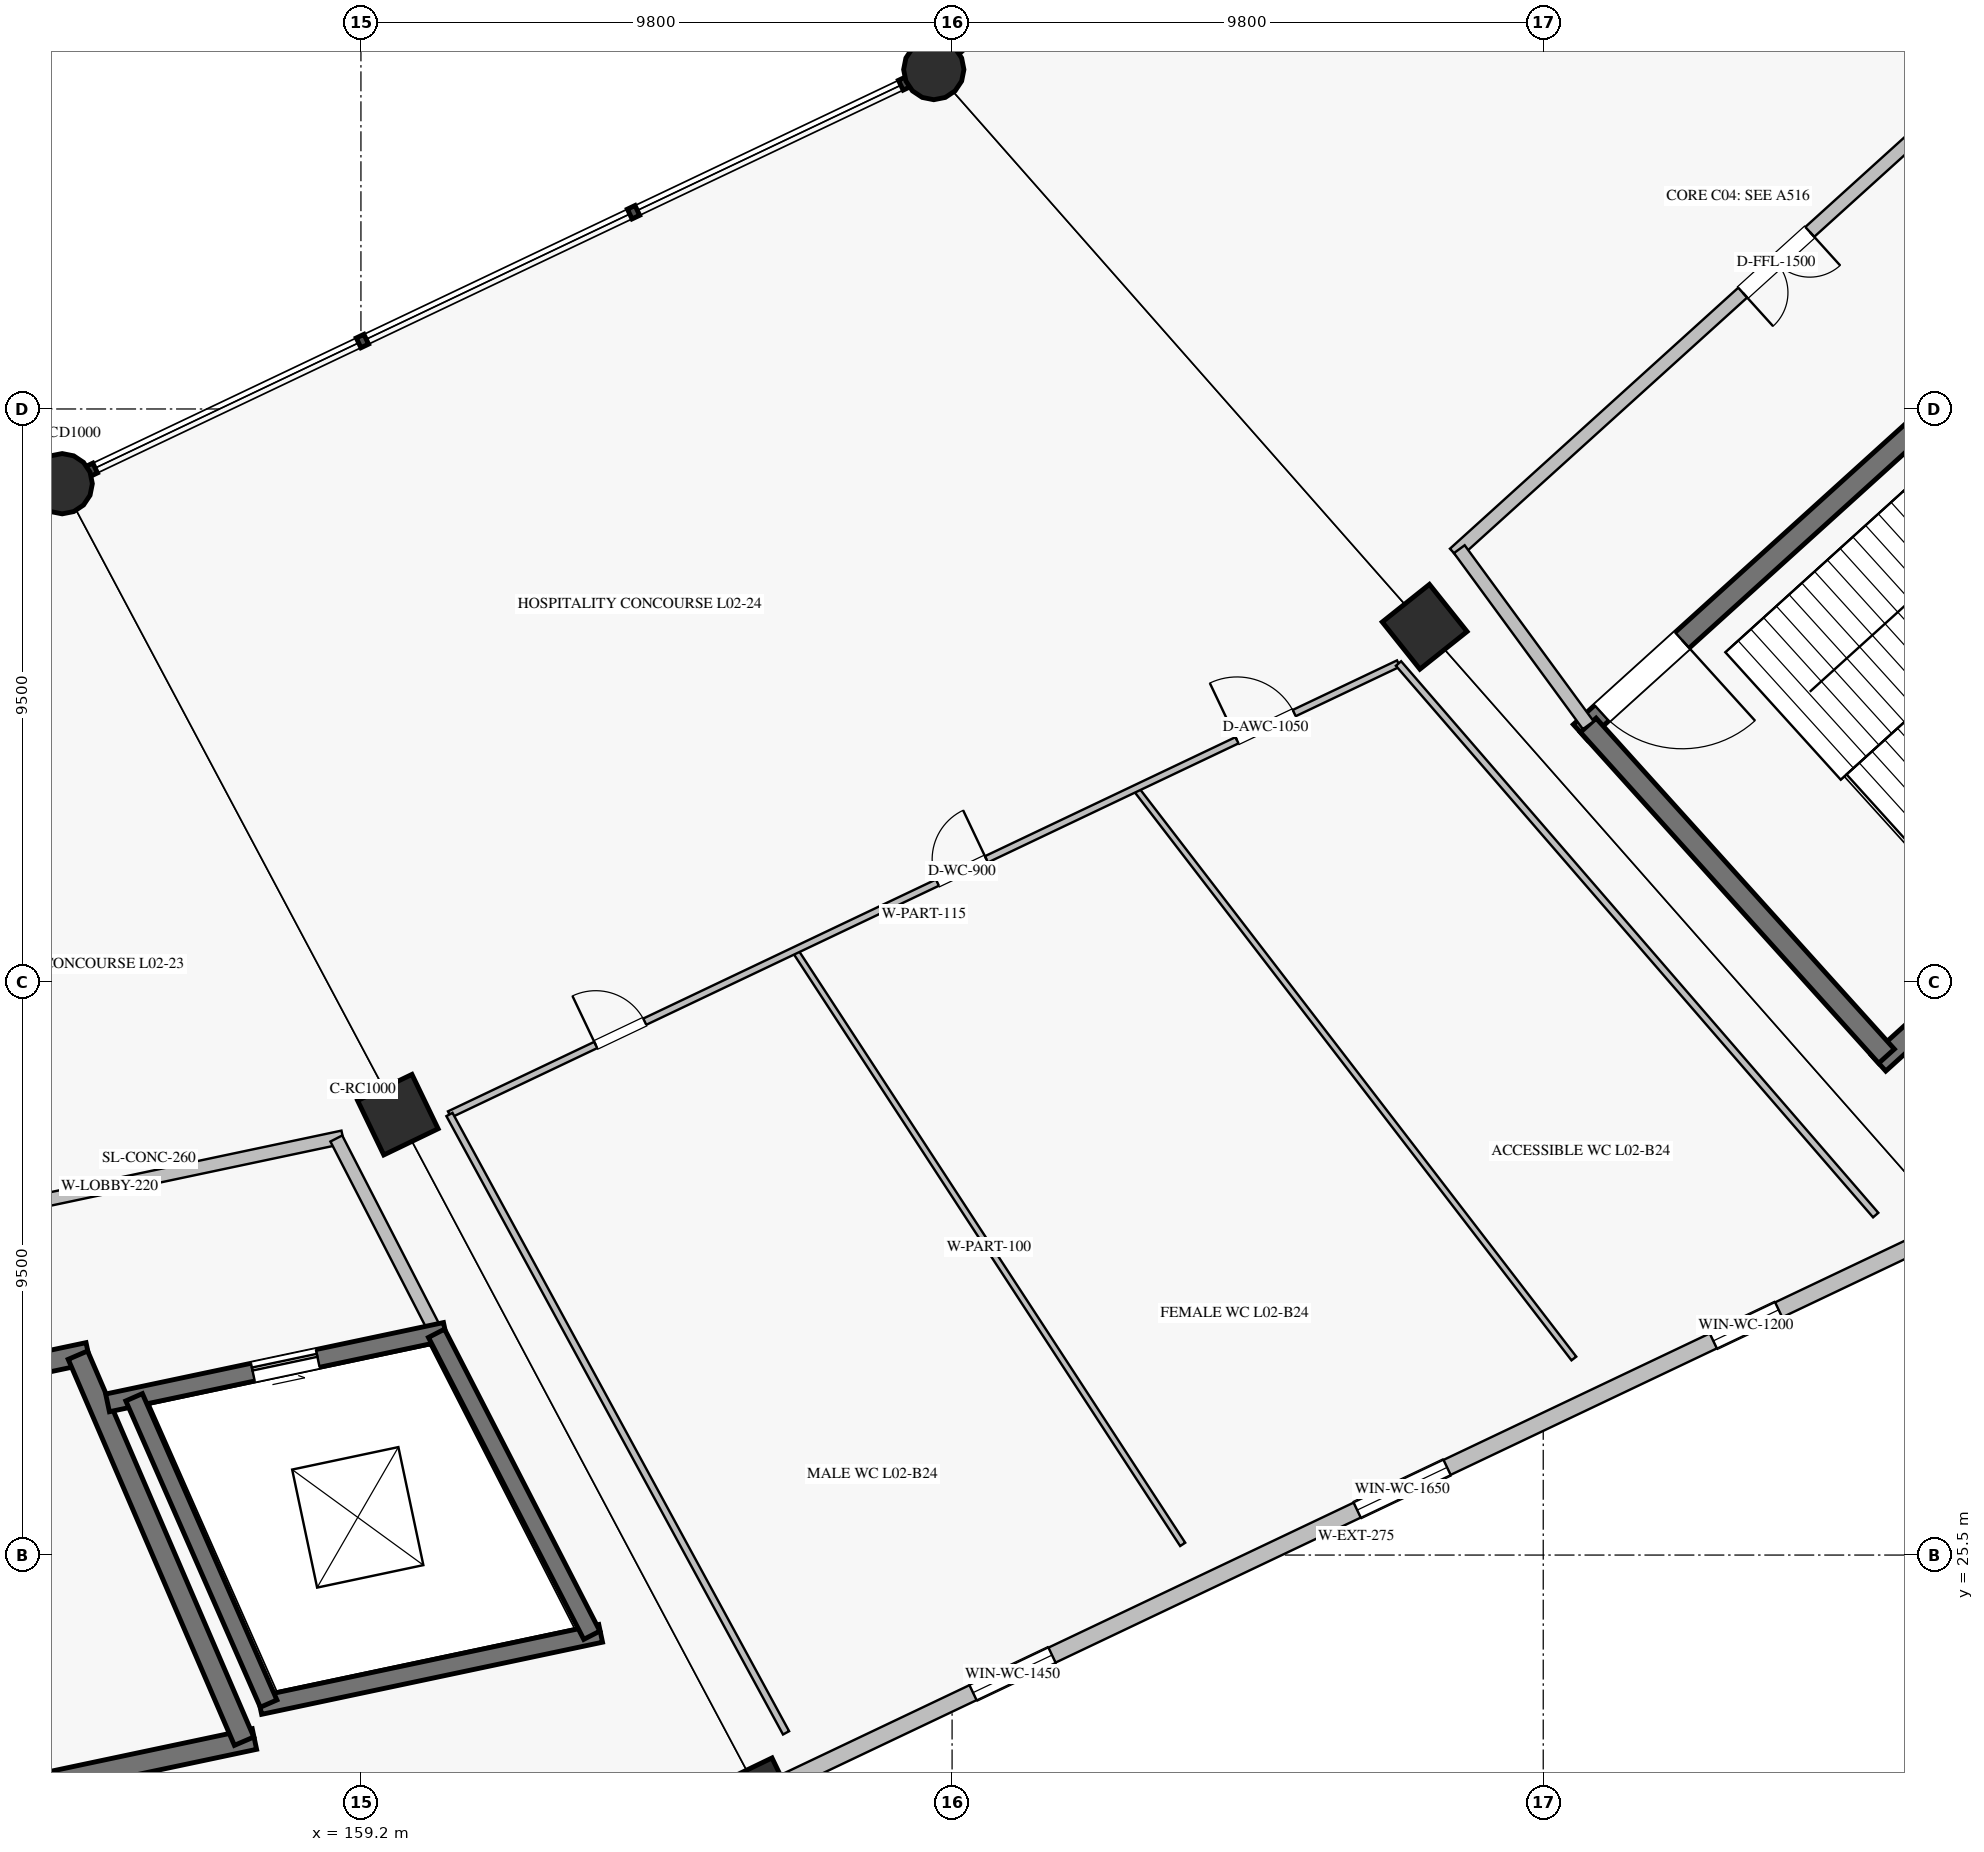
"""IFC4 building model, lengths in metres.
Left out: names, types, materials, properties, quantities, classifications, styles, units other than length and angle.
Written with IfcOpenShell. Run it as: python <this file> out.ifc"""

import sys

from ifc_helpers import new_model, si_unit, direction, frame, frame_2d, origin, origin_2d, place, context, subcontext, project, spatial, rectangle, circle, extrude, element, fill, save


model = new_model("IFC4")
c1 = context("Model", 3, precision=1e-05, world=origin(), true_north=direction((0.0, 1.0)))
c2 = subcontext(c1, "Body", "Model", "MODEL_VIEW")
j1 = project(units=[si_unit("LENGTHUNIT", "METRE"), si_unit("PLANEANGLEUNIT", "RADIAN")], contexts=[c1])
p1 = place(None, origin())
s1 = spatial("IfcSite", under=j1, at=p1, CompositionType="ELEMENT")
p2 = place(p1, origin())
s2 = spatial("IfcBuilding", under=s1, at=p2, CompositionType="ELEMENT")
p3 = place(p2, frame((0.0, 0.0, 10.54)))
s3 = spatial("IfcBuildingStorey", under=s2, at=p3, CompositionType="ELEMENT", Elevation=10.54)
for number, where, z_axis, x_axis in (
    (1, (154.248, 43.261, 0.0), (0.0, 0.0, 1.0), (0.434, -0.901, 0.0)),
    (2, (168.697, 50.127, 0.0), (0.0, 0.0, 1.0), (0.623, -0.782, 0.0)),
):
    element("IfcColumn", number, at=place(p3, frame(where, z_axis=z_axis, x_axis=x_axis)), inside=s3, PredefinedType="COLUMN", context=c2, shape_type="SweptSolid", body=[
        extrude(circle(Radius=0.5, at=origin_2d()), origin(), (0.0, 0.0, 1.0), 5.1),
    ])
for number, where, z_axis, x_axis in (
    (3, (159.812, 32.801, 0.0), (0.0, 0.0, 1.0), (0.434, -0.901, 0.0)),
    (4, (176.834, 40.889, 0.0), (0.0, 0.0, 1.0), (0.623, -0.782, 0.0)),
):
    element("IfcColumn", number, at=place(p3, frame(where, z_axis=z_axis, x_axis=x_axis)), inside=s3, PredefinedType="COLUMN", context=c2, shape_type="SweptSolid", body=[
        extrude(rectangle(XDim=1.0, YDim=1.0, at=origin_2d()), origin(), (0.0, 0.0, 1.0), 5.1),
    ])
p4 = place(p3, frame((165.805, 21.536, 0.0), z_axis=(0.0, 0.0, 1.0), x_axis=(0.433883739113, -0.900968867905, 0.0)))
e5 = element("IfcColumn", 5, at=p4, inside=s3, PredefinedType="COLUMN", context=c2, shape_type="SweptSolid", body=[
    extrude(rectangle(XDim=0.9, YDim=0.9, at=origin_2d()), origin(), (0.0, 0.0, 1.0), 5.1),
])
p5 = place(p3, frame((166.202, 21.725, 0.0), z_axis=(0.0, 0.0, 1.0), x_axis=(0.903214855299, 0.429188682478, 0.0)))
e6 = element("IfcWall", 6, at=p5, inside=s3, PredefinedType="SOLIDWALL", context=c2, shape_type="SweptSolid", body=[
    extrude(rectangle(XDim=21.034, YDim=0.275, at=frame_2d((10.517, 0.0))), origin(), (0.0, 0.0, 1.0), 4.138),
])
p6 = place(p5, frame((3.482, 0.0, 1.65)))
e7 = element("IfcOpeningElement", 7, at=p6, cuts=e6, PredefinedType="OPENING", context=c2, shape_type="SweptSolid", body=[
    extrude(rectangle(XDim=1.45, YDim=0.95, at=frame_2d((0.725, 0.475))), frame((0.0, 0.147, 0.0), z_axis=(0.0, -1.0, 0.0), x_axis=(1.0, 0.0, 0.0)), (0.0, 0.0, 1.0), 0.295),
])
p7 = place(p5, frame((10.533, 0.0, 1.65)))
e8 = element("IfcOpeningElement", 8, at=p7, cuts=e6, PredefinedType="OPENING", context=c2, shape_type="SweptSolid", body=[
    extrude(rectangle(XDim=1.65, YDim=1.0, at=frame_2d((0.825, 0.5))), frame((0.0, 0.147, 0.0), z_axis=(0.0, -1.0, 0.0), x_axis=(1.0, 0.0, 0.0)), (0.0, 0.0, 1.0), 0.295),
])
p8 = place(p5, frame((17.069, 0.0, 1.65)))
e9 = element("IfcOpeningElement", 9, at=p8, cuts=e6, PredefinedType="OPENING", context=c2, shape_type="SweptSolid", body=[
    extrude(rectangle(XDim=1.2, YDim=0.9, at=frame_2d((0.6, 0.45))), frame((0.0, 0.147, 0.0), z_axis=(0.0, -1.0, 0.0), x_axis=(1.0, 0.0, 0.0)), (0.0, 0.0, 1.0), 0.295),
])
p9 = place(p3, frame((142.896, 26.357, 0.0), z_axis=(0.0, 0.0, 1.0), x_axis=(0.978345203961, 0.206979858648, 0.0)))
e10 = element("IfcWall", 10, at=p9, inside=s3, PredefinedType="SHEAR", context=c2, shape_type="SweptSolid", body=[
    extrude(rectangle(XDim=12.044, YDim=0.35, at=frame_2d((6.022, 0.0))), origin(), (0.0, 0.0, 1.0), 4.84),
])
p10 = place(p9, frame((0.475, 0.0, 0.0)))
e11 = element("IfcOpeningElement", 11, at=p10, cuts=e10, PredefinedType="OPENING", context=c2, shape_type="SweptSolid", body=[
    extrude(rectangle(XDim=1.8, YDim=2.2, at=frame_2d((0.9, 1.1))), frame((0.0, 0.185, 0.0), z_axis=(0.0, -1.0, 0.0), x_axis=(1.0, 0.0, 0.0)), (0.0, 0.0, 1.0), 0.37),
])
p11 = place(p3, frame((144.65, 19.746, 0.0), z_axis=(0.0, 0.0, 1.0), x_axis=(0.978345119536, 0.206980257705, 0.0)))
e12 = element("IfcWall", 12, at=p11, inside=s3, PredefinedType="SHEAR", context=c2, shape_type="SweptSolid", body=[
    extrude(rectangle(XDim=13.067, YDim=0.35, at=frame_2d((6.533, 0.0))), origin(), (0.0, 0.0, 1.0), 4.84),
])
p12 = place(p3, frame((154.508, 28.814, 0.0), z_axis=(0.0, 0.0, 1.0), x_axis=(0.395453834155, -0.918485854574, 0.0)))
e13 = element("IfcWall", 13, at=p12, inside=s3, PredefinedType="SHEAR", context=c2, shape_type="SweptSolid", body=[
    extrude(rectangle(XDim=6.968, YDim=0.35, at=frame_2d((3.484, 0.0))), origin(), (0.0, 0.0, 1.0), 4.84),
])
p13 = place(p3, frame((154.999, 28.023, 0.0), z_axis=(0.0, 0.0, 1.0), x_axis=(0.978345218992, 0.206979787601, 0.0)))
e14 = element("IfcWall", 14, at=p13, inside=s3, PredefinedType="SHEAR", context=c2, shape_type="SweptSolid", body=[
    extrude(rectangle(XDim=5.724, YDim=0.3, at=frame_2d((2.862, 0.0))), origin(), (0.0, 0.0, 1.0), 4.84),
])
p14 = place(p13, frame((2.462, 0.0, 0.0)))
e15 = element("IfcOpeningElement", 15, at=p14, cuts=e14, PredefinedType="OPENING", context=c2, shape_type="SweptSolid", body=[
    extrude(rectangle(XDim=1.1, YDim=2.2, at=frame_2d((0.55, 1.1))), frame((0.0, 0.16, 0.0), z_axis=(0.0, -1.0, 0.0), x_axis=(1.0, 0.0, 0.0)), (0.0, 0.0, 1.0), 0.32),
])
p15 = place(p3, frame((157.523, 23.006, 0.0), z_axis=(0.0, 0.0, 1.0), x_axis=(0.978347069901, 0.206971038591, 0.0)))
e16 = element("IfcWall", 16, at=p15, inside=s3, PredefinedType="SHEAR", context=c2, shape_type="SweptSolid", body=[
    extrude(rectangle(XDim=5.776, YDim=0.3, at=frame_2d((2.888, 0.0))), origin(), (0.0, 0.0, 1.0), 4.84),
])
p16 = place(p3, frame((155.44, 28.116, 0.0), z_axis=(0.0, 0.0, 1.0), x_axis=(0.402005363577, -0.915637312289, 0.0)))
e17 = element("IfcWall", 17, at=p16, inside=s3, PredefinedType="SHEAR", context=c2, shape_type="SweptSolid", body=[
    extrude(rectangle(XDim=5.547, YDim=0.3, at=frame_2d((2.773, 0.0))), origin(), (0.0, 0.0, 1.0), 4.84),
])
p17 = place(p3, frame((160.453, 29.177, 0.0), z_axis=(0.0, 0.0, 1.0), x_axis=(0.457368592987, -0.889277217829, 0.0)))
e18 = element("IfcWall", 18, at=p17, inside=s3, PredefinedType="SHEAR", context=c2, shape_type="SweptSolid", body=[
    extrude(rectangle(XDim=5.629, YDim=0.3, at=frame_2d((2.814, 0.0))), origin(), (0.0, 0.0, 1.0), 4.84),
])
p18 = place(p3, frame((142.284, 28.914, 0.0), z_axis=(0.0, 0.0, 1.0), x_axis=(0.97834522483, 0.206979760008, 0.0)))
e19 = element("IfcWall", 19, at=p18, inside=s3, PredefinedType="SOLIDWALL", context=c2, shape_type="SweptSolid", body=[
    extrude(rectangle(XDim=16.983, YDim=0.22, at=frame_2d((8.491, 0.0))), origin(), (0.0, 0.0, 1.0), 3.788),
])
p19 = place(p18, frame((6.903, 0.0, 0.0)))
e20 = element("IfcOpeningElement", 20, at=p19, cuts=e19, PredefinedType="OPENING", context=c2, shape_type="SweptSolid", body=[
    extrude(rectangle(XDim=1.5, YDim=2.2, at=frame_2d((0.75, 1.1))), frame((0.0, 0.12, 0.0), z_axis=(0.0, -1.0, 0.0), x_axis=(1.0, 0.0, 0.0)), (0.0, 0.0, 1.0), 0.24),
])
p20 = place(p3, frame((158.792, 32.406, 0.0), z_axis=(0.0, 0.0, 1.0), x_axis=(0.457349531643, -0.889287021105, 0.0)))
e21 = element("IfcWall", 21, at=p20, inside=s3, PredefinedType="SOLIDWALL", context=c2, shape_type="SweptSolid", body=[
    extrude(rectangle(XDim=3.632, YDim=0.22, at=frame_2d((1.816, 0.0))), origin(), (0.0, 0.0, 1.0), 4.84),
])
p21 = place(p3, frame((179.417, 39.14, 0.0), z_axis=(0.0, 0.0, 1.0), x_axis=(0.741348929385, 0.671119784315, 0.0)))
e22 = element("IfcWall", 22, at=p21, inside=s3, PredefinedType="SHEAR", context=c2, shape_type="SweptSolid", body=[
    extrude(rectangle(XDim=11.826, YDim=0.35, at=frame_2d((5.913, 0.0))), origin(), (0.0, 0.0, 1.0), 4.84),
])
p22 = place(p21, frame((0.475, 0.0, 0.0)))
e23 = element("IfcOpeningElement", 23, at=p22, cuts=e22, PredefinedType="OPENING", context=c2, shape_type="SweptSolid", body=[
    extrude(rectangle(XDim=1.8, YDim=2.2, at=frame_2d((0.9, 1.1))), frame((0.0, 0.185, 0.0), z_axis=(0.0, -1.0, 0.0), x_axis=(1.0, 0.0, 0.0)), (0.0, 0.0, 1.0), 0.37),
])
p23 = place(p3, frame((184.361, 33.653, 0.0), z_axis=(0.0, 0.0, 1.0), x_axis=(0.741351373721, 0.671117084183, 0.0)))
e24 = element("IfcWall", 24, at=p23, inside=s3, PredefinedType="SHEAR", context=c2, shape_type="SweptSolid", body=[
    extrude(rectangle(XDim=12.83, YDim=0.35, at=frame_2d((6.415, 0.0))), origin(), (0.0, 0.0, 1.0), 4.84),
])
p24 = place(p3, frame((179.546, 39.257, 0.0), z_axis=(0.0, 0.0, 1.0), x_axis=(0.669463145673, -0.742845270958, 0.0)))
e25 = element("IfcWall", 25, at=p24, inside=s3, PredefinedType="SHEAR", context=c2, shape_type="SweptSolid", body=[
    extrude(rectangle(XDim=7.386, YDim=0.35, at=frame_2d((3.693, 0.0))), origin(), (0.0, 0.0, 1.0), 4.84),
])
p25 = place(p3, frame((177.327, 42.102, 0.0), z_axis=(0.0, 0.0, 1.0), x_axis=(0.741351035574, 0.671117457717, 0.0)))
e26 = element("IfcWall", 26, at=p25, inside=s3, PredefinedType="SOLIDWALL", context=c2, shape_type="SweptSolid", body=[
    extrude(rectangle(XDim=15.969, YDim=0.22, at=frame_2d((7.985, 0.0))), origin(), (0.0, 0.0, 1.0), 4.84),
])
p26 = place(p25, frame((6.447, 0.0, 0.0)))
e27 = element("IfcOpeningElement", 27, at=p26, cuts=e26, PredefinedType="OPENING", context=c2, shape_type="SweptSolid", body=[
    extrude(rectangle(XDim=1.5, YDim=2.2, at=frame_2d((0.75, 1.1))), frame((0.0, 0.12, 0.0), z_axis=(0.0, -1.0, 0.0), x_axis=(1.0, 0.0, 0.0)), (0.0, 0.0, 1.0), 0.24),
])
p27 = place(p3, frame((177.409, 42.176, 0.0), z_axis=(0.0, 0.0, 1.0), x_axis=(0.590836915359, -0.806791013491, 0.0)))
e28 = element("IfcWall", 28, at=p27, inside=s3, PredefinedType="SOLIDWALL", context=c2, shape_type="SweptSolid", body=[
    extrude(rectangle(XDim=3.618, YDim=0.22, at=frame_2d((1.809, 0.0))), origin(), (0.0, 0.0, 1.0), 4.84),
])
p28 = place(p3, frame((160.667, 32.804, 0.0), z_axis=(0.0, 0.0, 1.0), x_axis=(0.903217202186, 0.429183743488, 0.0)))
e29 = element("IfcWall", 29, at=p28, inside=s3, PredefinedType="PARTITIONING", context=c2, shape_type="SweptSolid", body=[
    extrude(rectangle(XDim=17.419, YDim=0.115, at=frame_2d((8.709, 0.0))), origin(), (0.0, 0.0, 1.0), 4.16),
])
p29 = place(p28, frame((2.685, 0.0, 0.0)))
e30 = element("IfcOpeningElement", 30, at=p29, cuts=e29, PredefinedType="OPENING", context=c2, shape_type="SweptSolid", body=[
    extrude(rectangle(XDim=0.9, YDim=2.1, at=frame_2d((0.45, 1.05))), frame((0.0, 0.067, 0.0), z_axis=(0.0, -1.0, 0.0), x_axis=(1.0, 0.0, 0.0)), (0.0, 0.0, 1.0), 0.135),
])
p30 = place(p28, frame((8.956, 0.0, 0.0)))
e31 = element("IfcOpeningElement", 31, at=p30, cuts=e29, PredefinedType="OPENING", context=c2, shape_type="SweptSolid", body=[
    extrude(rectangle(XDim=0.9, YDim=2.1, at=frame_2d((0.45, 1.05))), frame((0.0, 0.067, 0.0), z_axis=(0.0, -1.0, 0.0), x_axis=(1.0, 0.0, 0.0)), (0.0, 0.0, 1.0), 0.135),
])
p31 = place(p28, frame((14.455, 0.0, 0.0)))
e32 = element("IfcOpeningElement", 32, at=p31, cuts=e29, PredefinedType="OPENING", context=c2, shape_type="SweptSolid", body=[
    extrude(rectangle(XDim=1.05, YDim=2.1, at=frame_2d((0.525, 1.05))), frame((0.0, 0.067, 0.0), z_axis=(0.0, -1.0, 0.0), x_axis=(1.0, 0.0, 0.0)), (0.0, 0.0, 1.0), 0.135),
])
p32 = place(p3, frame((160.667, 32.804, 0.0), z_axis=(0.0, 0.0, 1.0), x_axis=(0.478125060974, -0.878291765912, 0.0)))
e33 = element("IfcWall", 33, at=p32, inside=s3, PredefinedType="PARTITIONING", context=c2, shape_type="SweptSolid", body=[
    extrude(rectangle(XDim=11.672, YDim=0.115, at=frame_2d((5.836, 0.0))), origin(), (0.0, 0.0, 1.0), 4.16),
])
p33 = place(p3, frame((176.401, 40.28, 0.0), z_axis=(0.0, 0.0, 1.0), x_axis=(0.654293035882, -0.756241114458, 0.0)))
e34 = element("IfcWall", 34, at=p33, inside=s3, PredefinedType="PARTITIONING", context=c2, shape_type="SweptSolid", body=[
    extrude(rectangle(XDim=12.091, YDim=0.115, at=frame_2d((6.045, 0.0))), origin(), (0.0, 0.0, 1.0), 4.16),
])
p34 = place(p3, frame((166.394, 35.525, 0.0), z_axis=(0.0, 0.0, 1.0), x_axis=(0.546626140003, -0.837376774854, 0.0)))
e35 = element("IfcWall", 35, at=p34, inside=s3, PredefinedType="PARTITIONING", context=c2, shape_type="SweptSolid", body=[
    extrude(rectangle(XDim=11.761, YDim=0.1, at=frame_2d((5.88, 0.0))), origin(), (0.0, 0.0, 1.0), 4.16),
])
p35 = place(p3, frame((172.042, 38.209, 0.0), z_axis=(0.0, 0.0, 1.0), x_axis=(0.609492992165, -0.792791455871, 0.0)))
e36 = element("IfcWall", 36, at=p35, inside=s3, PredefinedType="PARTITIONING", context=c2, shape_type="SweptSolid", body=[
    extrude(rectangle(XDim=11.921, YDim=0.1, at=frame_2d((5.96, 0.0))), origin(), (0.0, 0.0, 1.0), 4.16),
])
p36 = place(p6, origin())
e37 = element("IfcWindow", 37, at=p36, inside=s3, PartitioningType="SINGLE_PANEL", PredefinedType="WINDOW", context=c2, shape_type="SweptSolid", body=[
    extrude(rectangle(XDim=1.45, YDim=0.95, at=frame_2d((0.725, 0.475))), frame((0.0, 0.03, 0.0), z_axis=(0.0, -1.0, 0.0), x_axis=(1.0, 0.0, 0.0)), (0.0, 0.0, 1.0), 0.06),
])
fill(e7, e37)
p37 = place(p7, origin())
e38 = element("IfcWindow", 38, at=p37, inside=s3, PartitioningType="SINGLE_PANEL", PredefinedType="WINDOW", context=c2, shape_type="SweptSolid", body=[
    extrude(rectangle(XDim=1.65, YDim=1.0, at=frame_2d((0.825, 0.5))), frame((0.0, 0.03, 0.0), z_axis=(0.0, -1.0, 0.0), x_axis=(1.0, 0.0, 0.0)), (0.0, 0.0, 1.0), 0.06),
])
fill(e8, e38)
p38 = place(p8, origin())
e39 = element("IfcWindow", 39, at=p38, inside=s3, PartitioningType="SINGLE_PANEL", PredefinedType="WINDOW", context=c2, shape_type="SweptSolid", body=[
    extrude(rectangle(XDim=1.2, YDim=0.9, at=frame_2d((0.6, 0.45))), frame((0.0, 0.03, 0.0), z_axis=(0.0, -1.0, 0.0), x_axis=(1.0, 0.0, 0.0)), (0.0, 0.0, 1.0), 0.06),
])
fill(e9, e39)
p39 = place(p14, origin())
e40 = element("IfcDoor", 40, at=p39, inside=s3, OperationType="SLIDING_TO_RIGHT", PredefinedType="DOOR", context=c2, shape_type="SweptSolid", body=[
    extrude(rectangle(XDim=1.1, YDim=2.2, at=frame_2d((0.55, 1.1))), frame((0.0, 0.025, 0.0), z_axis=(0.0, -1.0, 0.0), x_axis=(1.0, 0.0, 0.0)), (0.0, 0.0, 1.0), 0.05),
])
fill(e15, e40)
p40 = place(p22, frame((1.8, 0.0, 0.0), z_axis=(0.0, 0.0, 1.0), x_axis=(-1.0, 0.0, 0.0)))
e41 = element("IfcDoor", 41, at=p40, inside=s3, OperationType="SINGLE_SWING_LEFT", PredefinedType="DOOR", context=c2, shape_type="SweptSolid", body=[
    extrude(rectangle(XDim=1.8, YDim=2.2, at=frame_2d((0.9, 1.1))), frame((0.0, 0.025, 0.0), z_axis=(0.0, -1.0, 0.0), x_axis=(1.0, 0.0, 0.0)), (0.0, 0.0, 1.0), 0.05),
])
fill(e23, e41)
p41 = place(p26, frame((1.5, 0.0, 0.0), z_axis=(0.0, 0.0, 1.0), x_axis=(-1.0, 0.0, 0.0)))
e42 = element("IfcDoor", 42, at=p41, inside=s3, OperationType="DOUBLE_DOOR_SINGLE_SWING", PredefinedType="DOOR", context=c2, shape_type="SweptSolid", body=[
    extrude(rectangle(XDim=1.5, YDim=2.2, at=frame_2d((0.75, 1.1))), frame((0.0, 0.025, 0.0), z_axis=(0.0, -1.0, 0.0), x_axis=(1.0, 0.0, 0.0)), (0.0, 0.0, 1.0), 0.05),
])
fill(e27, e42)
p42 = place(p29, origin())
e43 = element("IfcDoor", 43, at=p42, inside=s3, OperationType="SINGLE_SWING_LEFT", PredefinedType="DOOR", context=c2, shape_type="SweptSolid", body=[
    extrude(rectangle(XDim=0.9, YDim=2.1, at=frame_2d((0.45, 1.05))), frame((0.0, 0.025, 0.0), z_axis=(0.0, -1.0, 0.0), x_axis=(1.0, 0.0, 0.0)), (0.0, 0.0, 1.0), 0.05),
])
fill(e30, e43)
p43 = place(p30, origin())
e44 = element("IfcDoor", 44, at=p43, inside=s3, OperationType="SINGLE_SWING_RIGHT", PredefinedType="DOOR", context=c2, shape_type="SweptSolid", body=[
    extrude(rectangle(XDim=0.9, YDim=2.1, at=frame_2d((0.45, 1.05))), frame((0.0, 0.025, 0.0), z_axis=(0.0, -1.0, 0.0), x_axis=(1.0, 0.0, 0.0)), (0.0, 0.0, 1.0), 0.05),
])
fill(e31, e44)
p44 = place(p31, origin())
e45 = element("IfcDoor", 45, at=p44, inside=s3, OperationType="SINGLE_SWING_LEFT", PredefinedType="DOOR", context=c2, shape_type="SweptSolid", body=[
    extrude(rectangle(XDim=1.05, YDim=2.1, at=frame_2d((0.525, 1.05))), frame((0.0, 0.025, 0.0), z_axis=(0.0, -1.0, 0.0), x_axis=(1.0, 0.0, 0.0)), (0.0, 0.0, 1.0), 0.05),
])
fill(e32, e45)
save(model, sys.argv[1])
